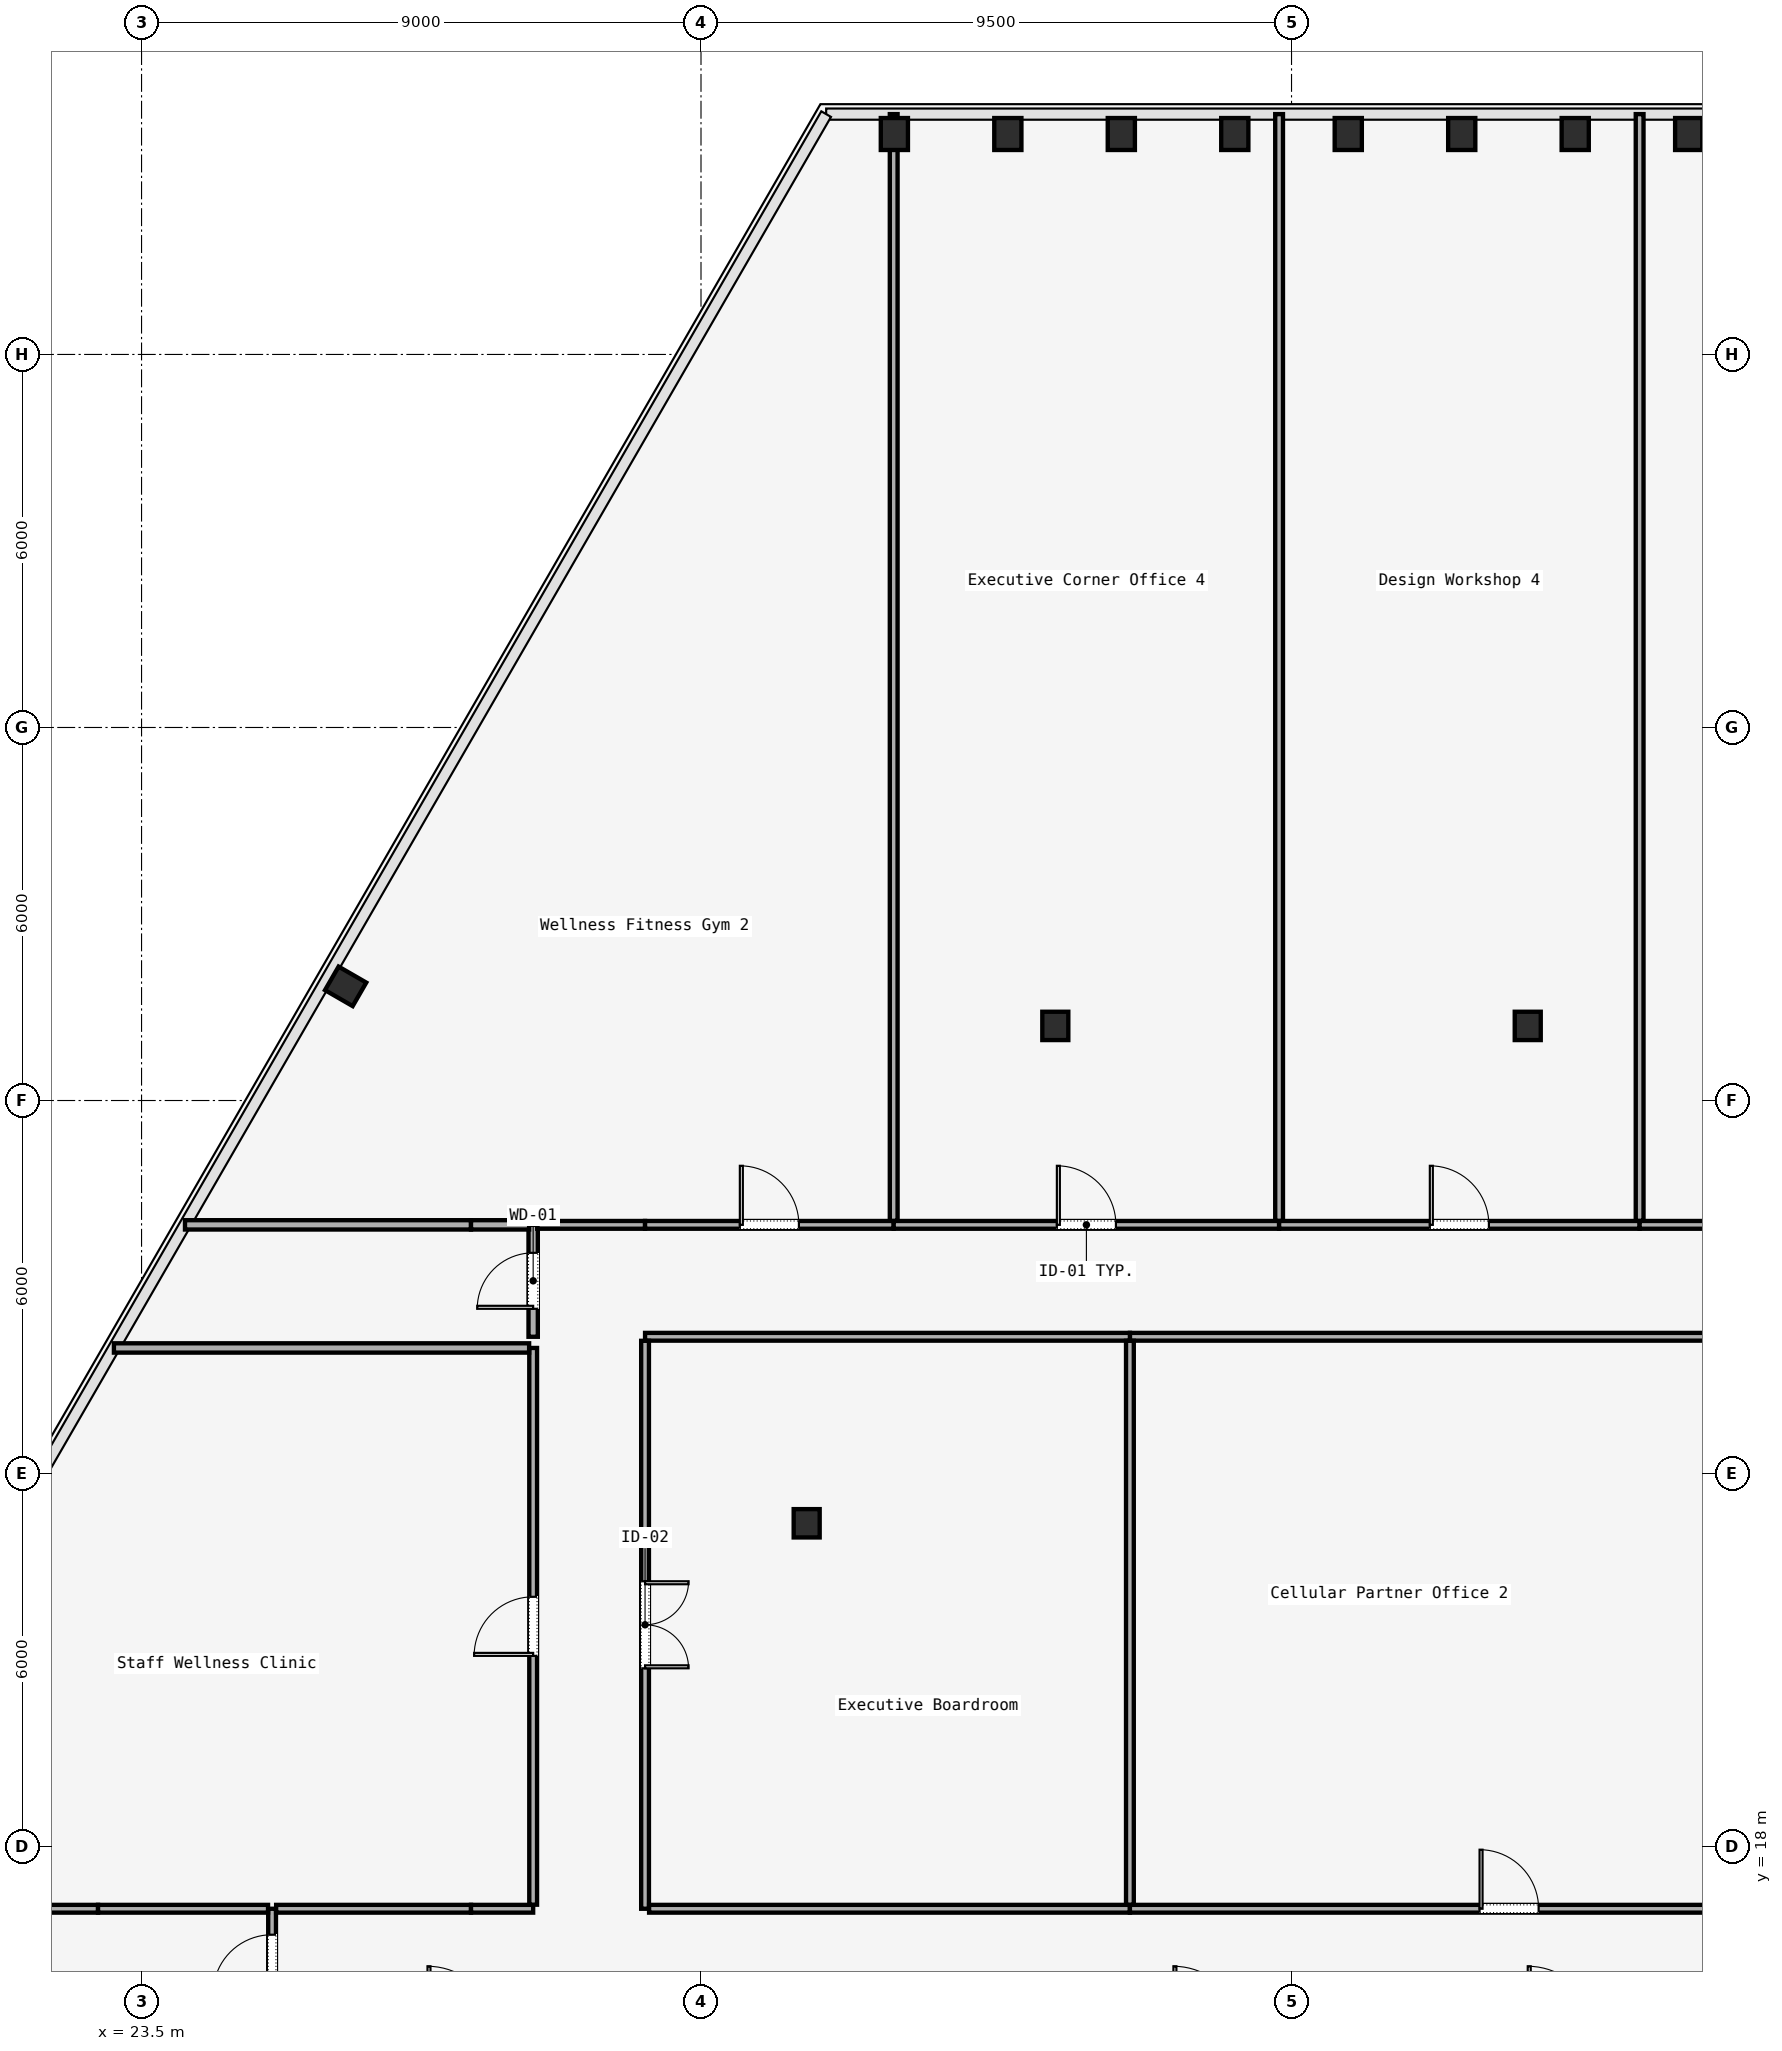
"""IFC4 building model, lengths in metres.
Left out: names, types, materials, properties, quantities, classifications, styles, units other than length and angle.
Written with IfcOpenShell. Run it as: python <this file> out.ifc"""

import sys

from ifc_helpers import new_model, si_unit, direction, frame, frame_2d, origin, origin_2d, place, context, subcontext, project, spatial, rectangle, i_section, extrude, element, fill, save


model = new_model("IFC4")
c1 = context("Model", 3, precision=1e-05, world=origin(), true_north=direction((0.0, 1.0)))
c2 = subcontext(c1, "Body", "Model", "MODEL_VIEW")
j1 = project(units=[si_unit("LENGTHUNIT", "METRE"), si_unit("PLANEANGLEUNIT", "RADIAN")], contexts=[c1])
p1 = place(None, origin())
s1 = spatial("IfcSite", under=j1, at=p1, CompositionType="ELEMENT")
p2 = place(p1, origin())
s2 = spatial("IfcBuilding", under=s1, at=p2, CompositionType="ELEMENT")
p3 = place(p2, frame((0.0, 0.0, 74.0)))
s3 = spatial("IfcBuildingStorey", under=s2, at=p3, CompositionType="ELEMENT", Elevation=74.0)
for number, where, z_axis, x_axis in (
    (1, (34.2, 23.2, 0.0), (0.0, 0.0, 1.0), (1.0, 0.0, 0.0)),
    (2, (38.2, 31.2, 0.0), (0.0, 0.0, 1.0), (1.0, 0.0, 0.0)),
    (3, (45.8, 31.2, 0.0), (0.0, 0.0, 1.0), (1.0, 0.0, 0.0)),
):
    element("IfcColumn", number, at=place(p3, frame(where, z_axis=z_axis, x_axis=x_axis)), inside=s3, PredefinedType="COLUMN", context=c2, shape_type="SweptSolid", body=[
        extrude(i_section(OverallWidth=0.418, OverallDepth=0.456, WebThickness=0.042, FlangeThickness=0.067, FilletRadius=0.015, at=origin_2d()), origin(), (0.0, 0.0, 1.0), 3.58),
    ])
for number, where, z_axis, x_axis in (
    (4, (48.389, 45.546, 0.0), (0.0, 0.0, 1.0), (1.0, 0.0, 0.0)),
    (5, (46.564, 45.546, 0.0), (0.0, 0.0, 1.0), (1.0, 0.0, 0.0)),
    (6, (44.738, 45.546, 0.0), (0.0, 0.0, 1.0), (1.0, 0.0, 0.0)),
    (7, (42.913, 45.546, 0.0), (0.0, 0.0, 1.0), (1.0, 0.0, 0.0)),
    (8, (41.087, 45.546, 0.0), (0.0, 0.0, 1.0), (1.0, 0.0, 0.0)),
    (9, (39.262, 45.546, 0.0), (0.0, 0.0, 1.0), (1.0, 0.0, 0.0)),
    (10, (37.436, 45.546, 0.0), (0.0, 0.0, 1.0), (1.0, 0.0, 0.0)),
    (11, (35.611, 45.546, 0.0), (0.0, 0.0, 1.0), (1.0, 0.0, 0.0)),
    (12, (26.783, 31.836, 0.0), (0.0, 0.0, 1.0), (0.5, 0.866, 0.0)),
):
    element("IfcColumn", number, at=place(p3, frame(where, z_axis=z_axis, x_axis=x_axis)), inside=s3, PredefinedType="COLUMN", context=c2, shape_type="SweptSolid", body=[
        extrude(i_section(OverallWidth=0.437, OverallDepth=0.514, WebThickness=0.061, FlangeThickness=0.077, FilletRadius=0.015, at=origin_2d()), origin(), (0.0, 0.0, 1.0), 3.58),
    ])
p4 = place(p3, frame((25.6, 15.215, 0.0), z_axis=(0.0, 0.0, 1.0), x_axis=(0.0, 1.0, 0.0)))
e13 = element("IfcWall", 13, at=p4, inside=s3, PredefinedType="PARTITIONING", context=c2, shape_type="SweptSolid", body=[
    extrude(rectangle(XDim=1.785, YDim=0.125, at=frame_2d((0.893, 0.0))), origin(), (0.0, 0.0, 1.0), 2.95),
])
p5 = place(p4, frame((0.417, 0.0, 0.0)))
e14 = element("IfcOpeningElement", 14, at=p5, cuts=e13, PredefinedType="OPENING", context=c2, shape_type="SweptSolid", body=[
    extrude(rectangle(XDim=0.95, YDim=2.2, at=frame_2d((0.475, 1.1))), frame((0.0, 0.062, 0.0), z_axis=(0.0, -1.0, 0.0), x_axis=(1.0, 0.0, 0.0)), (0.0, 0.0, 1.0), 0.125),
])
p6 = place(p3, frame((25.665, 17.0, 0.0), z_axis=(0.0, 0.0, 1.0), x_axis=(1.0, 0.0, 0.0)))
e15 = element("IfcWall", 15, at=p6, inside=s3, PredefinedType="PARTITIONING", context=c2, shape_type="SweptSolid", body=[
    extrude(rectangle(XDim=3.135, YDim=0.125, at=frame_2d((1.567, 0.0))), origin(), (0.0, 0.0, 1.0), 2.95),
])
p7 = place(p3, frame((28.8, 17.0, 0.0), z_axis=(0.0, 0.0, 1.0), x_axis=(1.0, 0.0, 0.0)))
e16 = element("IfcWall", 16, at=p7, inside=s3, PredefinedType="PARTITIONING", context=c2, shape_type="SweptSolid", body=[
    extrude(rectangle(XDim=1.0, YDim=0.125, at=frame_2d((0.5, 0.0))), origin(), (0.0, 0.0, 1.0), 2.95),
])
p8 = place(p3, frame((29.8, 17.065, 0.0), z_axis=(0.0, 0.0, 1.0), x_axis=(0.0, 1.0, 0.0)))
e17 = element("IfcWall", 17, at=p8, inside=s3, PredefinedType="PARTITIONING", context=c2, shape_type="SweptSolid", body=[
    extrude(rectangle(XDim=8.955, YDim=0.125, at=frame_2d((4.478, 0.0))), origin(), (0.0, 0.0, 1.0), 2.95),
])
p9 = place(p8, frame((4.002, 0.0, 0.0)))
e18 = element("IfcOpeningElement", 18, at=p9, cuts=e17, PredefinedType="OPENING", context=c2, shape_type="SweptSolid", body=[
    extrude(rectangle(XDim=0.95, YDim=2.2, at=frame_2d((0.475, 1.1))), frame((0.0, 0.062, 0.0), z_axis=(0.0, -1.0, 0.0), x_axis=(1.0, 0.0, 0.0)), (0.0, 0.0, 1.0), 0.125),
])
p10 = place(p3, frame((29.8, 26.2, 0.0), z_axis=(0.0, 0.0, 1.0), x_axis=(0.0, 1.0, 0.0)))
e19 = element("IfcWall", 19, at=p10, inside=s3, PredefinedType="PARTITIONING", context=c2, shape_type="SweptSolid", body=[
    extrude(rectangle(XDim=1.8, YDim=0.15, at=frame_2d((0.9, 0.0))), origin(), (0.0, 0.0, 1.0), 2.95),
])
p11 = place(p10, frame((0.45, 0.0, 0.0)))
e20 = element("IfcOpeningElement", 20, at=p11, cuts=e19, PredefinedType="OPENING", context=c2, shape_type="SweptSolid", body=[
    extrude(rectangle(XDim=0.9, YDim=2.15, at=frame_2d((0.45, 1.075))), frame((0.0, 0.075, 0.0), z_axis=(0.0, -1.0, 0.0), x_axis=(1.0, 0.0, 0.0)), (0.0, 0.0, 1.0), 0.15),
])
p12 = place(p3, frame((29.865, 28.0, 0.0), z_axis=(0.0, 0.0, 1.0), x_axis=(1.0, 0.0, 0.0)))
e21 = element("IfcWall", 21, at=p12, inside=s3, PredefinedType="PARTITIONING", context=c2, shape_type="SweptSolid", body=[
    extrude(rectangle(XDim=1.735, YDim=0.125, at=frame_2d((0.868, 0.0))), origin(), (0.0, 0.0, 1.0), 2.95),
])
p13 = place(p3, frame((31.6, 28.0, 0.0), z_axis=(0.0, 0.0, 1.0), x_axis=(1.0, 0.0, 0.0)))
e22 = element("IfcWall", 22, at=p13, inside=s3, PredefinedType="PARTITIONING", context=c2, shape_type="SweptSolid", body=[
    extrude(rectangle(XDim=4.0, YDim=0.125, at=frame_2d((2.0, 0.0))), origin(), (0.0, 0.0, 1.0), 2.95),
])
p14 = place(p13, frame((1.525, 0.0, 0.0)))
e23 = element("IfcOpeningElement", 23, at=p14, cuts=e22, PredefinedType="OPENING", context=c2, shape_type="SweptSolid", body=[
    extrude(rectangle(XDim=0.95, YDim=2.2, at=frame_2d((0.475, 1.1))), frame((0.0, 0.062, 0.0), z_axis=(0.0, -1.0, 0.0), x_axis=(1.0, 0.0, 0.0)), (0.0, 0.0, 1.0), 0.125),
])
p15 = place(p3, frame((35.6, 28.0, 0.0), z_axis=(0.0, 0.0, 1.0), x_axis=(1.0, 0.0, 0.0)))
e24 = element("IfcWall", 24, at=p15, inside=s3, PredefinedType="PARTITIONING", context=c2, shape_type="SweptSolid", body=[
    extrude(rectangle(XDim=6.2, YDim=0.125, at=frame_2d((3.1, 0.0))), origin(), (0.0, 0.0, 1.0), 2.95),
])
p16 = place(p15, frame((2.625, 0.0, 0.0)))
e25 = element("IfcOpeningElement", 25, at=p16, cuts=e24, PredefinedType="OPENING", context=c2, shape_type="SweptSolid", body=[
    extrude(rectangle(XDim=0.95, YDim=2.2, at=frame_2d((0.475, 1.1))), frame((0.0, 0.062, 0.0), z_axis=(0.0, -1.0, 0.0), x_axis=(1.0, 0.0, 0.0)), (0.0, 0.0, 1.0), 0.125),
])
p17 = place(p3, frame((41.8, 28.0, 0.0), z_axis=(0.0, 0.0, 1.0), x_axis=(1.0, 0.0, 0.0)))
e26 = element("IfcWall", 26, at=p17, inside=s3, PredefinedType="PARTITIONING", context=c2, shape_type="SweptSolid", body=[
    extrude(rectangle(XDim=5.8, YDim=0.125, at=frame_2d((2.9, 0.0))), origin(), (0.0, 0.0, 1.0), 2.95),
])
p18 = place(p17, frame((2.425, 0.0, 0.0)))
e27 = element("IfcOpeningElement", 27, at=p18, cuts=e26, PredefinedType="OPENING", context=c2, shape_type="SweptSolid", body=[
    extrude(rectangle(XDim=0.95, YDim=2.2, at=frame_2d((0.475, 1.1))), frame((0.0, 0.062, 0.0), z_axis=(0.0, -1.0, 0.0), x_axis=(1.0, 0.0, 0.0)), (0.0, 0.0, 1.0), 0.125),
])
p19 = place(p3, frame((47.6, 28.0, 0.0), z_axis=(0.0, 0.0, 1.0), x_axis=(1.0, 0.0, 0.0)))
e28 = element("IfcWall", 28, at=p19, inside=s3, PredefinedType="PARTITIONING", context=c2, shape_type="SweptSolid", body=[
    extrude(rectangle(XDim=4.0, YDim=0.125, at=frame_2d((2.0, 0.0))), origin(), (0.0, 0.0, 1.0), 2.95),
])
p20 = place(p19, frame((1.525, 0.0, 0.0)))
e29 = element("IfcOpeningElement", 29, at=p20, cuts=e28, PredefinedType="OPENING", context=c2, shape_type="SweptSolid", body=[
    extrude(rectangle(XDim=0.95, YDim=2.2, at=frame_2d((0.475, 1.1))), frame((0.0, 0.062, 0.0), z_axis=(0.0, -1.0, 0.0), x_axis=(1.0, 0.0, 0.0)), (0.0, 0.0, 1.0), 0.125),
])
p21 = place(p3, frame((51.535, 26.2, 0.0), z_axis=(0.0, 0.0, 1.0), x_axis=(-1.0, 0.0, 0.0)))
e30 = element("IfcWall", 30, at=p21, inside=s3, PredefinedType="PARTITIONING", context=c2, shape_type="SweptSolid", body=[
    extrude(rectangle(XDim=12.135, YDim=0.125, at=frame_2d((6.067, 0.0))), origin(), (0.0, 0.0, 1.0), 2.95),
])
p22 = place(p3, frame((39.4, 26.2, 0.0), z_axis=(0.0, 0.0, 1.0), x_axis=(-1.0, 0.0, 0.0)))
e31 = element("IfcWall", 31, at=p22, inside=s3, PredefinedType="PARTITIONING", context=c2, shape_type="SweptSolid", body=[
    extrude(rectangle(XDim=7.8, YDim=0.125, at=frame_2d((3.9, 0.0))), origin(), (0.0, 0.0, 1.0), 2.95),
])
p23 = place(p3, frame((31.6, 26.135, 0.0), z_axis=(0.0, 0.0, 1.0), x_axis=(0.0, -1.0, 0.0)))
e32 = element("IfcWall", 32, at=p23, inside=s3, PredefinedType="PARTITIONING", context=c2, shape_type="SweptSolid", body=[
    extrude(rectangle(XDim=9.135, YDim=0.125, at=frame_2d((4.567, 0.0))), origin(), (0.0, 0.0, 1.0), 2.95),
])
p24 = place(p23, frame((3.867, 0.0, 0.0)))
e33 = element("IfcOpeningElement", 33, at=p24, cuts=e32, PredefinedType="OPENING", context=c2, shape_type="SweptSolid", body=[
    extrude(rectangle(XDim=1.4, YDim=2.2, at=frame_2d((0.7, 1.1))), frame((0.0, 0.062, 0.0), z_axis=(0.0, -1.0, 0.0), x_axis=(1.0, 0.0, 0.0)), (0.0, 0.0, 1.0), 0.125),
])
p25 = place(p3, frame((31.665, 17.0, 0.0), z_axis=(0.0, 0.0, 1.0), x_axis=(1.0, 0.0, 0.0)))
e34 = element("IfcWall", 34, at=p25, inside=s3, PredefinedType="PARTITIONING", context=c2, shape_type="SweptSolid", body=[
    extrude(rectangle(XDim=7.735, YDim=0.125, at=frame_2d((3.867, 0.0))), origin(), (0.0, 0.0, 1.0), 2.95),
])
p26 = place(p3, frame((39.4, 17.0, 0.0), z_axis=(0.0, 0.0, 1.0), x_axis=(1.0, 0.0, 0.0)))
e35 = element("IfcWall", 35, at=p26, inside=s3, PredefinedType="PARTITIONING", context=c2, shape_type="SweptSolid", body=[
    extrude(rectangle(XDim=12.2, YDim=0.125, at=frame_2d((6.1, 0.0))), origin(), (0.0, 0.0, 1.0), 2.95),
])
p27 = place(p26, frame((5.625, 0.0, 0.0)))
e36 = element("IfcOpeningElement", 36, at=p27, cuts=e35, PredefinedType="OPENING", context=c2, shape_type="SweptSolid", body=[
    extrude(rectangle(XDim=0.95, YDim=2.2, at=frame_2d((0.475, 1.1))), frame((0.0, 0.062, 0.0), z_axis=(0.0, -1.0, 0.0), x_axis=(1.0, 0.0, 0.0)), (0.0, 0.0, 1.0), 0.125),
])
p28 = place(p3, frame((19.149, 17.0, 0.0), z_axis=(0.0, 0.0, 1.0), x_axis=(1.0, 0.0, 0.0)))
e37 = element("IfcWall", 37, at=p28, inside=s3, PredefinedType="PARTITIONING", context=c2, shape_type="SweptSolid", body=[
    extrude(rectangle(XDim=3.651, YDim=0.125, at=frame_2d((1.825, 0.0))), origin(), (0.0, 0.0, 1.0), 2.95),
])
p29 = place(p3, frame((22.8, 17.0, 0.0), z_axis=(0.0, 0.0, 1.0), x_axis=(1.0, 0.0, 0.0)))
e38 = element("IfcWall", 38, at=p29, inside=s3, PredefinedType="PARTITIONING", context=c2, shape_type="SweptSolid", body=[
    extrude(rectangle(XDim=2.735, YDim=0.125, at=frame_2d((1.367, 0.0))), origin(), (0.0, 0.0, 1.0), 2.95),
])
p30 = place(p3, frame((23.055, 26.02, 0.0), z_axis=(0.0, 0.0, 1.0), x_axis=(1.0, 0.0, 0.0)))
e39 = element("IfcWall", 39, at=p30, inside=s3, PredefinedType="PARTITIONING", context=c2, shape_type="SweptSolid", body=[
    extrude(rectangle(XDim=6.68, YDim=0.15, at=frame_2d((3.34, 0.0))), origin(), (0.0, 0.0, 1.0), 2.95),
])
p31 = place(p3, frame((39.4, 26.135, 0.0), z_axis=(0.0, 0.0, 1.0), x_axis=(0.0, -1.0, 0.0)))
e40 = element("IfcWall", 40, at=p31, inside=s3, PredefinedType="PARTITIONING", context=c2, shape_type="SweptSolid", body=[
    extrude(rectangle(XDim=9.07, YDim=0.125, at=frame_2d((4.535, 0.0))), origin(), (0.0, 0.0, 1.0), 2.95),
])
p32 = place(p3, frame((24.199, 28.0, 0.0), z_axis=(0.0, 0.0, 1.0), x_axis=(1.0, 0.0, 0.0)))
e41 = element("IfcWall", 41, at=p32, inside=s3, PredefinedType="PARTITIONING", context=c2, shape_type="SweptSolid", body=[
    extrude(rectangle(XDim=4.601, YDim=0.15, at=frame_2d((2.301, 0.0))), origin(), (0.0, 0.0, 1.0), 2.95),
])
p33 = place(p3, frame((28.8, 28.0, 0.0), z_axis=(0.0, 0.0, 1.0), x_axis=(1.0, 0.0, 0.0)))
e42 = element("IfcWall", 42, at=p33, inside=s3, PredefinedType="PARTITIONING", context=c2, shape_type="SweptSolid", body=[
    extrude(rectangle(XDim=0.935, YDim=0.15, at=frame_2d((0.468, 0.0))), origin(), (0.0, 0.0, 1.0), 2.95),
])
for number, where, z_axis, x_axis in (
    (43, (35.6, 45.865, 0.0), (0.0, 0.0, 1.0), (0.0, -1.0, 0.0)),
    (44, (47.6, 28.065, 0.0), (0.0, 0.0, 1.0), (0.0, 1.0, 0.0)),
    (45, (41.8, 45.865, 0.0), (0.0, 0.0, 1.0), (0.0, -1.0, 0.0)),
):
    element("IfcWall", number, at=place(p3, frame(where, z_axis=z_axis, x_axis=x_axis)), inside=s3, PredefinedType="PARTITIONING", context=c2, shape_type="SweptSolid", body=[
        extrude(rectangle(XDim=17.801, YDim=0.125, at=frame_2d((8.9, 0.0))), origin(), (0.0, 0.0, 1.0), 2.95),
    ])
p34 = place(p5, origin())
e46 = element("IfcDoor", 46, at=p34, inside=s3, OperationType="SINGLE_SWING_LEFT", PredefinedType="DOOR", context=c2, shape_type="SweptSolid", body=[
    extrude(rectangle(XDim=0.95, YDim=2.2, at=frame_2d((0.475, 1.1))), frame((0.0, 0.025, 0.0), z_axis=(0.0, -1.0, 0.0), x_axis=(1.0, 0.0, 0.0)), (0.0, 0.0, 1.0), 0.05),
])
fill(e14, e46)
p35 = place(p9, origin())
e47 = element("IfcDoor", 47, at=p35, inside=s3, OperationType="SINGLE_SWING_LEFT", PredefinedType="DOOR", context=c2, shape_type="SweptSolid", body=[
    extrude(rectangle(XDim=0.95, YDim=2.2, at=frame_2d((0.475, 1.1))), frame((0.0, 0.025, 0.0), z_axis=(0.0, -1.0, 0.0), x_axis=(1.0, 0.0, 0.0)), (0.0, 0.0, 1.0), 0.05),
])
fill(e18, e47)
p36 = place(p24, origin())
e48 = element("IfcDoor", 48, at=p36, inside=s3, OperationType="SINGLE_SWING_RIGHT", PredefinedType="DOOR", context=c2, shape_type="SweptSolid", body=[
    extrude(rectangle(XDim=1.4, YDim=2.2, at=frame_2d((0.7, 1.1))), frame((0.0, 0.025, 0.0), z_axis=(0.0, -1.0, 0.0), x_axis=(1.0, 0.0, 0.0)), (0.0, 0.0, 1.0), 0.05),
])
fill(e33, e48)
p37 = place(p27, origin())
e49 = element("IfcDoor", 49, at=p37, inside=s3, OperationType="SINGLE_SWING_LEFT", PredefinedType="DOOR", context=c2, shape_type="SweptSolid", body=[
    extrude(rectangle(XDim=0.95, YDim=2.2, at=frame_2d((0.475, 1.1))), frame((0.0, 0.025, 0.0), z_axis=(0.0, -1.0, 0.0), x_axis=(1.0, 0.0, 0.0)), (0.0, 0.0, 1.0), 0.05),
])
fill(e36, e49)
p38 = place(p11, origin())
e50 = element("IfcDoor", 50, at=p38, inside=s3, OperationType="SINGLE_SWING_RIGHT", PredefinedType="DOOR", context=c2, shape_type="SweptSolid", body=[
    extrude(rectangle(XDim=0.9, YDim=2.15, at=frame_2d((0.45, 1.075))), frame((0.0, 0.025, 0.0), z_axis=(0.0, -1.0, 0.0), x_axis=(1.0, 0.0, 0.0)), (0.0, 0.0, 1.0), 0.05),
])
fill(e20, e50)
p39 = place(p14, origin())
e51 = element("IfcDoor", 51, at=p39, inside=s3, OperationType="SINGLE_SWING_LEFT", PredefinedType="DOOR", context=c2, shape_type="SweptSolid", body=[
    extrude(rectangle(XDim=0.95, YDim=2.2, at=frame_2d((0.475, 1.1))), frame((0.0, 0.025, 0.0), z_axis=(0.0, -1.0, 0.0), x_axis=(1.0, 0.0, 0.0)), (0.0, 0.0, 1.0), 0.05),
])
fill(e23, e51)
p40 = place(p16, origin())
e52 = element("IfcDoor", 52, at=p40, inside=s3, OperationType="SINGLE_SWING_LEFT", PredefinedType="DOOR", context=c2, shape_type="SweptSolid", body=[
    extrude(rectangle(XDim=0.95, YDim=2.2, at=frame_2d((0.475, 1.1))), frame((0.0, 0.025, 0.0), z_axis=(0.0, -1.0, 0.0), x_axis=(1.0, 0.0, 0.0)), (0.0, 0.0, 1.0), 0.05),
])
fill(e25, e52)
p41 = place(p18, origin())
e53 = element("IfcDoor", 53, at=p41, inside=s3, OperationType="SINGLE_SWING_RIGHT", PredefinedType="DOOR", context=c2, shape_type="SweptSolid", body=[
    extrude(rectangle(XDim=0.95, YDim=2.2, at=frame_2d((0.475, 1.1))), frame((0.0, 0.025, 0.0), z_axis=(0.0, -1.0, 0.0), x_axis=(1.0, 0.0, 0.0)), (0.0, 0.0, 1.0), 0.05),
])
fill(e27, e53)
save(model, sys.argv[1])
